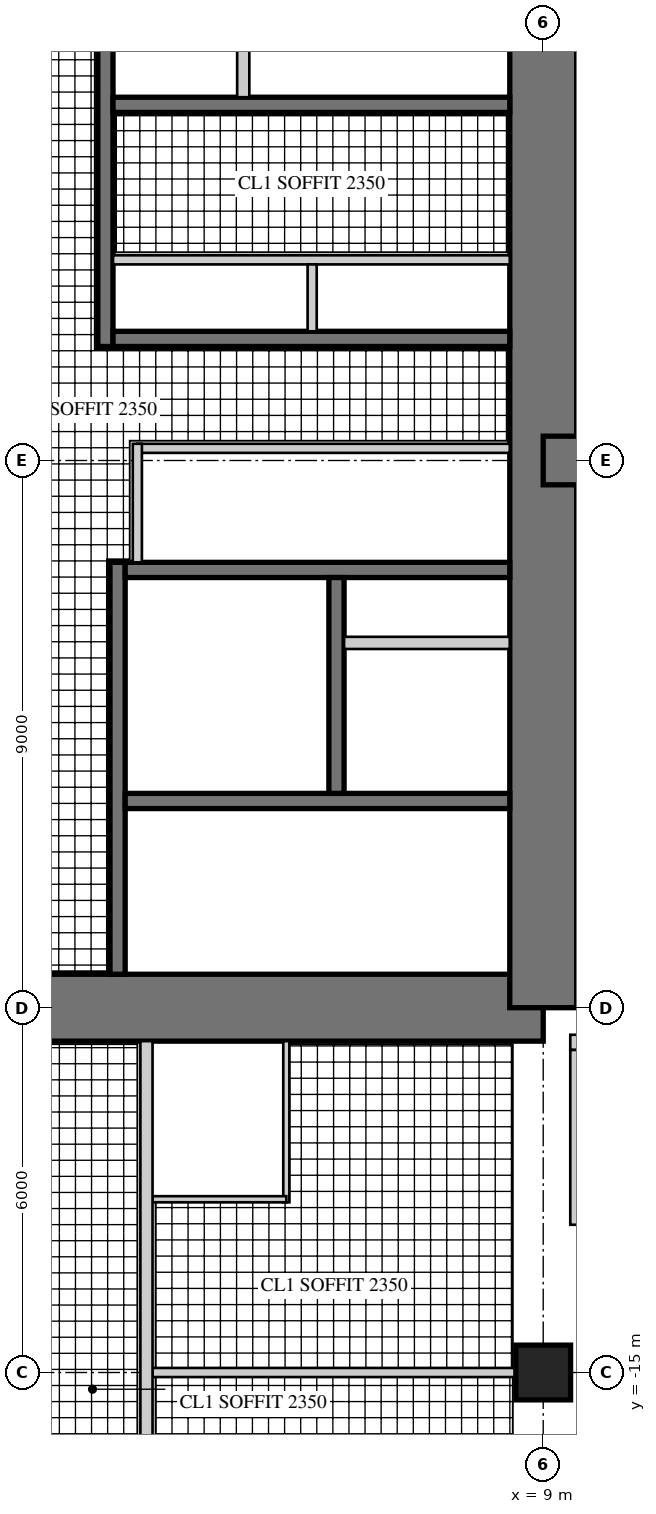
"""IFC4 building model, lengths in metres.
Left out: names, types, materials, properties, quantities, classifications, styles, units other than length and angle.
Written with IfcOpenShell. Run it as: python <this file> out.ifc"""

import sys

from ifc_helpers import new_model, si_unit, direction, frame, frame_2d, origin, origin_2d, place, context, subcontext, project, spatial, rectangle, hollow_rectangle, extrude, element, fill, save


model = new_model("IFC4")
c1 = context("Model", 3, precision=1e-05, world=origin(), true_north=direction((0.0, 1.0)))
c2 = subcontext(c1, "Body", "Model", "MODEL_VIEW")
j1 = project(units=[si_unit("LENGTHUNIT", "METRE"), si_unit("PLANEANGLEUNIT", "RADIAN")], contexts=[c1])
p1 = place(None, origin())
s1 = spatial("IfcSite", under=j1, at=p1, CompositionType="ELEMENT")
p2 = place(p1, origin())
s2 = spatial("IfcBuilding", under=s1, at=p2, CompositionType="ELEMENT")
p3 = place(p2, frame((0.0, 0.0, 200.1)))
s3 = spatial("IfcBuildingStorey", under=s2, at=p3, CompositionType="ELEMENT", Elevation=200.1)
p4 = place(p3, frame((-9.0, -9.0, 0.0), z_axis=(0.0, 0.0, 1.0), x_axis=(1.0, 0.0, 0.0)))
e1 = element("IfcWall", 1, at=p4, inside=s3, PredefinedType="SHEAR", context=c2, shape_type="SweptSolid", body=[
    extrude(rectangle(XDim=18.0, YDim=1.1, at=frame_2d((9.0, 0.0))), origin(), (0.0, 0.0, 1.0), 3.4),
])
p5 = place(p4, frame((9.8, 0.0, 0.0)))
e2 = element("IfcOpeningElement", 2, at=p5, cuts=e1, PredefinedType="OPENING", context=c2, shape_type="SweptSolid", body=[
    extrude(rectangle(XDim=1.0, YDim=2.4, at=frame_2d((0.5, 1.2))), frame((0.0, 0.56, 0.0), z_axis=(0.0, -1.0, 0.0), x_axis=(1.0, 0.0, 0.0)), (0.0, 0.0, 1.0), 1.12),
])
p6 = place(p3, frame((9.0, -9.0, 0.0), z_axis=(0.0, 0.0, 1.0), x_axis=(0.0, 1.0, 0.0)))
e3 = element("IfcWall", 3, at=p6, inside=s3, PredefinedType="SHEAR", context=c2, shape_type="SweptSolid", body=[
    extrude(rectangle(XDim=18.0, YDim=1.1, at=frame_2d((9.0, 0.0))), origin(), (0.0, 0.0, 1.0), 3.4),
])
p7 = place(p6, frame((9.8, 0.0, 0.0)))
e4 = element("IfcOpeningElement", 4, at=p7, cuts=e3, PredefinedType="OPENING", context=c2, shape_type="SweptSolid", body=[
    extrude(rectangle(XDim=1.0, YDim=2.4, at=frame_2d((0.5, 1.2))), frame((0.0, 0.56, 0.0), z_axis=(0.0, -1.0, 0.0), x_axis=(1.0, 0.0, 0.0)), (0.0, 0.0, 1.0), 1.12),
])
p8 = place(p3, frame((1.8, 1.875, 0.0), z_axis=(0.0, 0.0, 1.0), x_axis=(0.0, 1.0, 0.0)))
e5 = element("IfcWall", 5, at=p8, inside=s3, PredefinedType="SHEAR", context=c2, shape_type="SweptSolid", body=[
    extrude(rectangle(XDim=6.575, YDim=0.25, at=frame_2d((3.288, 0.0))), origin(), (0.0, 0.0, 1.0), 3.4),
])
p9 = place(p8, frame((1.875, 0.0, 0.0)))
e6 = element("IfcOpeningElement", 6, at=p9, cuts=e5, PredefinedType="OPENING", context=c2, shape_type="SweptSolid", body=[
    extrude(rectangle(XDim=1.6, YDim=2.4, at=frame_2d((0.8, 1.2))), frame((0.0, 0.135, 0.0), z_axis=(0.0, -1.0, 0.0), x_axis=(1.0, 0.0, 0.0)), (0.0, 0.0, 1.0), 0.27),
])
p10 = place(p3, frame((1.925, 2.0, 0.0), z_axis=(0.0, 0.0, 1.0), x_axis=(1.0, 0.0, 0.0)))
e7 = element("IfcWall", 7, at=p10, inside=s3, PredefinedType="SHEAR", context=c2, shape_type="SweptSolid", body=[
    extrude(rectangle(XDim=6.525, YDim=0.25, at=frame_2d((3.262, 0.0))), origin(), (0.0, 0.0, 1.0), 3.4),
])
p11 = place(p3, frame((1.925, 5.85, 0.0), z_axis=(0.0, 0.0, 1.0), x_axis=(1.0, 0.0, 0.0)))
e8 = element("IfcWall", 8, at=p11, inside=s3, PredefinedType="SHEAR", context=c2, shape_type="SweptSolid", body=[
    extrude(rectangle(XDim=6.525, YDim=0.25, at=frame_2d((3.262, 0.0))), origin(), (0.0, 0.0, 1.0), 3.4),
])
p12 = place(p11, frame((0.521, 0.0, 0.0)))
e9 = element("IfcOpeningElement", 9, at=p12, cuts=e8, PredefinedType="OPENING", context=c2, shape_type="SweptSolid", body=[
    extrude(rectangle(XDim=1.0, YDim=2.1, at=frame_2d((0.5, 1.05))), frame((0.0, 0.135, 0.0), z_axis=(0.0, -1.0, 0.0), x_axis=(1.0, 0.0, 0.0)), (0.0, 0.0, 1.0), 0.27),
])
p13 = place(p11, frame((2.762, 0.0, 0.0)))
e10 = element("IfcOpeningElement", 10, at=p13, cuts=e8, PredefinedType="OPENING", context=c2, shape_type="SweptSolid", body=[
    extrude(rectangle(XDim=1.0, YDim=2.1, at=frame_2d((0.5, 1.05))), frame((0.0, 0.135, 0.0), z_axis=(0.0, -1.0, 0.0), x_axis=(1.0, 0.0, 0.0)), (0.0, 0.0, 1.0), 0.27),
])
p14 = place(p3, frame((1.925, 3.3, 0.0), z_axis=(0.0, 0.0, 1.0), x_axis=(1.0, 0.0, 0.0)))
e11 = element("IfcWall", 11, at=p14, inside=s3, PredefinedType="PARTITIONING", context=c2, shape_type="SweptSolid", body=[
    extrude(rectangle(XDim=6.525, YDim=0.15, at=frame_2d((3.262, 0.0))), origin(), (0.0, 0.0, 1.0), 3.4),
])
p15 = place(p14, frame((0.075, 0.0, 0.0)))
e12 = element("IfcOpeningElement", 12, at=p15, cuts=e11, PredefinedType="OPENING", context=c2, shape_type="SweptSolid", body=[
    extrude(rectangle(XDim=0.8, YDim=2.1, at=frame_2d((0.4, 1.05))), frame((0.0, 0.085, 0.0), z_axis=(0.0, -1.0, 0.0), x_axis=(1.0, 0.0, 0.0)), (0.0, 0.0, 1.0), 0.17),
])
p16 = place(p14, frame((3.675, 0.0, 0.0)))
e13 = element("IfcOpeningElement", 13, at=p16, cuts=e11, PredefinedType="OPENING", context=c2, shape_type="SweptSolid", body=[
    extrude(rectangle(XDim=0.8, YDim=2.1, at=frame_2d((0.4, 1.05))), frame((0.0, 0.085, 0.0), z_axis=(0.0, -1.0, 0.0), x_axis=(1.0, 0.0, 0.0)), (0.0, 0.0, 1.0), 0.17),
])
p17 = place(p3, frame((5.2, 2.125, 0.0), z_axis=(0.0, 0.0, 1.0), x_axis=(0.0, 1.0, 0.0)))
e14 = element("IfcWall", 14, at=p17, inside=s3, PredefinedType="PARTITIONING", context=c2, shape_type="SweptSolid", body=[
    extrude(rectangle(XDim=1.1, YDim=0.15, at=frame_2d((0.55, 0.0))), origin(), (0.0, 0.0, 1.0), 3.4),
])
p18 = place(p3, frame((4.067, 5.975, 0.0), z_axis=(0.0, 0.0, 1.0), x_axis=(0.0, 1.0, 0.0)))
e15 = element("IfcWall", 15, at=p18, inside=s3, PredefinedType="PARTITIONING", context=c2, shape_type="SweptSolid", body=[
    extrude(rectangle(XDim=2.475, YDim=0.2, at=frame_2d((1.237, 0.0))), origin(), (0.0, 0.0, 1.0), 3.4),
])
p19 = place(p3, frame((2.0, -1.675, 0.0), z_axis=(0.0, 0.0, 1.0), x_axis=(0.0, -1.0, 0.0)))
e16 = element("IfcWall", 16, at=p19, inside=s3, PredefinedType="SHEAR", context=c2, shape_type="SweptSolid", body=[
    extrude(rectangle(XDim=6.775, YDim=0.25, at=frame_2d((3.387, 0.0))), origin(), (0.0, 0.0, 1.0), 3.4),
])
p20 = place(p19, frame((0.725, 0.0, 0.0)))
e17 = element("IfcOpeningElement", 17, at=p20, cuts=e16, PredefinedType="OPENING", context=c2, shape_type="SweptSolid", body=[
    extrude(rectangle(XDim=1.0, YDim=2.1, at=frame_2d((0.5, 1.05))), frame((0.0, 0.135, 0.0), z_axis=(0.0, -1.0, 0.0), x_axis=(1.0, 0.0, 0.0)), (0.0, 0.0, 1.0), 0.27),
])
p21 = place(p3, frame((2.125, -1.8, 0.0), z_axis=(0.0, 0.0, 1.0), x_axis=(1.0, 0.0, 0.0)))
e18 = element("IfcWall", 18, at=p21, inside=s3, PredefinedType="SHEAR", context=c2, shape_type="SweptSolid", body=[
    extrude(rectangle(XDim=6.325, YDim=0.25, at=frame_2d((3.163, 0.0))), origin(), (0.0, 0.0, 1.0), 3.4),
])
p22 = place(p3, frame((2.125, -5.6, 0.0), z_axis=(0.0, 0.0, 1.0), x_axis=(1.0, 0.0, 0.0)))
e19 = element("IfcWall", 19, at=p22, inside=s3, PredefinedType="SHEAR", context=c2, shape_type="SweptSolid", body=[
    extrude(rectangle(XDim=6.325, YDim=0.25, at=frame_2d((3.163, 0.0))), origin(), (0.0, 0.0, 1.0), 3.4),
])
p23 = place(p22, frame((0.175, 0.0, 0.0)))
e20 = element("IfcOpeningElement", 20, at=p23, cuts=e19, PredefinedType="OPENING", context=c2, shape_type="SweptSolid", body=[
    extrude(rectangle(XDim=1.0, YDim=2.1, at=frame_2d((0.5, 1.05))), frame((0.0, 0.135, 0.0), z_axis=(0.0, -1.0, 0.0), x_axis=(1.0, 0.0, 0.0)), (0.0, 0.0, 1.0), 0.27),
])
p24 = place(p3, frame((5.6, -1.925, 0.0), z_axis=(0.0, 0.0, 1.0), x_axis=(0.0, -1.0, 0.0)))
e21 = element("IfcWall", 21, at=p24, inside=s3, PredefinedType="SHEAR", context=c2, shape_type="SweptSolid", body=[
    extrude(rectangle(XDim=3.55, YDim=0.25, at=frame_2d((1.775, 0.0))), origin(), (0.0, 0.0, 1.0), 3.4),
])
p25 = place(p24, frame((1.525, 0.0, 0.0)))
e22 = element("IfcOpeningElement", 22, at=p25, cuts=e21, PredefinedType="OPENING", context=c2, shape_type="SweptSolid", body=[
    extrude(rectangle(XDim=1.1, YDim=2.2, at=frame_2d((0.55, 1.1))), frame((0.0, 0.135, 0.0), z_axis=(0.0, -1.0, 0.0), x_axis=(1.0, 0.0, 0.0)), (0.0, 0.0, 1.0), 0.27),
])
p26 = place(p24, frame((0.075, 0.0, 0.0)))
e23 = element("IfcOpeningElement", 23, at=p26, cuts=e21, PredefinedType="OPENING", context=c2, shape_type="SweptSolid", body=[
    extrude(rectangle(XDim=0.8, YDim=2.1, at=frame_2d((0.4, 1.05))), frame((0.0, 0.135, 0.0), z_axis=(0.0, -1.0, 0.0), x_axis=(1.0, 0.0, 0.0)), (0.0, 0.0, 1.0), 0.27),
])
p27 = place(p3, frame((5.725, -3.0, 0.0), z_axis=(0.0, 0.0, 1.0), x_axis=(1.0, 0.0, 0.0)))
e24 = element("IfcWall", 24, at=p27, inside=s3, PredefinedType="PARTITIONING", context=c2, shape_type="SweptSolid", body=[
    extrude(rectangle(XDim=2.725, YDim=0.2, at=frame_2d((1.362, 0.0))), origin(), (0.0, 0.0, 1.0), 3.4),
])
p28 = place(p3, frame((9.0, 0.0, 0.0), z_axis=(0.0, 0.0, 1.0), x_axis=(1.0, 0.0, 0.0)))
e25 = element("IfcWall", 25, at=p28, inside=s3, PredefinedType="SHEAR", context=c2, shape_type="SweptSolid", body=[
    extrude(rectangle(XDim=9.0, YDim=0.8, at=frame_2d((4.5, 0.0))), origin(), (0.0, 0.0, 1.0), 3.4),
])
p29 = place(p28, frame((3.95, 0.0, 0.0)))
e26 = element("IfcOpeningElement", 26, at=p29, cuts=e25, PredefinedType="OPENING", context=c2, shape_type="SweptSolid", body=[
    extrude(rectangle(XDim=1.0, YDim=2.15, at=frame_2d((0.5, 1.075))), frame((0.0, 0.41, 0.0), z_axis=(0.0, -1.0, 0.0), x_axis=(1.0, 0.0, 0.0)), (0.0, 0.0, 1.0), 0.82),
])
p30 = place(p28, frame((7.0, 0.0, 0.0)))
e27 = element("IfcOpeningElement", 27, at=p30, cuts=e25, PredefinedType="OPENING", context=c2, shape_type="SweptSolid", body=[
    extrude(rectangle(XDim=1.0, YDim=2.2, at=frame_2d((0.5, 1.1))), frame((0.0, 0.41, 0.0), z_axis=(0.0, -1.0, 0.0), x_axis=(1.0, 0.0, 0.0)), (0.0, 0.0, 1.0), 0.82),
])
p31 = place(p3, frame((9.0, -15.0, 0.0), z_axis=(0.0, 0.0, 1.0), x_axis=(1.0, 0.0, 0.0)))
e28 = element("IfcColumn", 28, at=p31, inside=s3, PredefinedType="COLUMN", context=c2, shape_type="SweptSolid", body=[
    extrude(rectangle(XDim=0.9, YDim=0.9, at=origin_2d()), origin(), (0.0, 0.0, 1.0), 3.4),
])
p32 = place(p3, frame((9.445, -9.57, 0.0), z_axis=(0.0, 0.0, 1.0), x_axis=(1.0, 0.0, 0.0)))
e29 = element("IfcWall", 29, at=p32, inside=s3, PredefinedType="SOLIDWALL", context=c2, shape_type="SweptSolid", body=[
    extrude(rectangle(XDim=3.125, YDim=0.25, at=frame_2d((1.562, 0.0))), origin(), (0.0, 0.0, 1.0), 3.22),
])
p33 = place(p32, frame((0.6, 0.0, 0.0)))
e30 = element("IfcOpeningElement", 30, at=p33, cuts=e29, PredefinedType="OPENING", context=c2, shape_type="SweptSolid", body=[
    extrude(rectangle(XDim=1.0, YDim=2.2, at=frame_2d((0.5, 1.1))), frame((0.0, 0.135, 0.0), z_axis=(0.0, -1.0, 0.0), x_axis=(1.0, 0.0, 0.0)), (0.0, 0.0, 1.0), 0.27),
])
p34 = place(p3, frame((9.57, -12.57, 0.0), z_axis=(0.0, 0.0, 1.0), x_axis=(0.0, 1.0, 0.0)))
e31 = element("IfcWall", 31, at=p34, inside=s3, PredefinedType="SOLIDWALL", context=c2, shape_type="SweptSolid", body=[
    extrude(rectangle(XDim=2.875, YDim=0.25, at=frame_2d((1.438, 0.0))), origin(), (0.0, 0.0, 1.0), 3.22),
])
p35 = place(p34, frame((0.6, 0.0, 0.0)))
e32 = element("IfcOpeningElement", 32, at=p35, cuts=e31, PredefinedType="OPENING", context=c2, shape_type="SweptSolid", body=[
    extrude(rectangle(XDim=1.0, YDim=2.2, at=frame_2d((0.5, 1.1))), frame((0.0, 0.135, 0.0), z_axis=(0.0, -1.0, 0.0), x_axis=(1.0, 0.0, 0.0)), (0.0, 0.0, 1.0), 0.27),
])
p36 = place(p3, frame((2.325, 0.2, 0.0), z_axis=(0.0, 0.0, 1.0), x_axis=(1.0, 0.0, 0.0)))
e33 = element("IfcWall", 33, at=p36, inside=s3, PredefinedType="PARTITIONING", context=c2, shape_type="SweptSolid", body=[
    extrude(rectangle(XDim=6.125, YDim=0.15, at=frame_2d((3.062, 0.0))), origin(), (0.0, 0.0, 1.0), 3.22),
])
p37 = place(p36, frame((0.4, 0.0, 0.0)))
e34 = element("IfcOpeningElement", 34, at=p37, cuts=e33, PredefinedType="OPENING", context=c2, shape_type="SweptSolid", body=[
    extrude(rectangle(XDim=1.0, YDim=2.1, at=frame_2d((0.5, 1.05))), frame((0.0, 0.085, 0.0), z_axis=(0.0, -1.0, 0.0), x_axis=(1.0, 0.0, 0.0)), (0.0, 0.0, 1.0), 0.17),
])
p38 = place(p3, frame((2.325, -1.675, 0.0), z_axis=(0.0, 0.0, 1.0), x_axis=(0.0, 1.0, 0.0)))
e35 = element("IfcWall", 35, at=p38, inside=s3, PredefinedType="PARTITIONING", context=c2, shape_type="SweptSolid", body=[
    extrude(rectangle(XDim=1.95, YDim=0.15, at=frame_2d((0.975, 0.0))), origin(), (0.0, 0.0, 1.0), 3.22),
])
p39 = place(p3, frame((9.55, 4.775, 0.0), z_axis=(0.0, 0.0, 1.0), x_axis=(1.0, 0.0, 0.0)))
e36 = element("IfcWall", 36, at=p39, inside=s3, PredefinedType="PARTITIONING", context=c2, shape_type="SweptSolid", body=[
    extrude(rectangle(XDim=3.1, YDim=0.1, at=frame_2d((1.55, 0.0))), origin(), (0.0, 0.0, 1.0), 3.22),
])
p40 = place(p3, frame((4.775, -9.55, 0.0), z_axis=(0.0, 0.0, 1.0), x_axis=(0.0, -1.0, 0.0)))
e37 = element("IfcWall", 37, at=p40, inside=s3, PredefinedType="PARTITIONING", context=c2, shape_type="SweptSolid", body=[
    extrude(rectangle(XDim=2.65, YDim=0.1, at=frame_2d((1.325, 0.0))), origin(), (0.0, 0.0, 1.0), 3.22),
])
p41 = place(p3, frame((2.575, -12.15, 0.0), z_axis=(0.0, 0.0, 1.0), x_axis=(1.0, 0.0, 0.0)))
e38 = element("IfcWall", 38, at=p41, inside=s3, PredefinedType="PARTITIONING", context=c2, shape_type="SweptSolid", body=[
    extrude(rectangle(XDim=2.2, YDim=0.1, at=frame_2d((1.1, 0.0))), origin(), (0.0, 0.0, 1.0), 3.22),
])
p42 = place(p41, frame((0.55, 0.0, 0.0)))
e39 = element("IfcOpeningElement", 39, at=p42, cuts=e38, PredefinedType="OPENING", context=c2, shape_type="SweptSolid", body=[
    extrude(rectangle(XDim=0.9, YDim=2.1, at=frame_2d((0.45, 1.05))), frame((0.0, 0.06, 0.0), z_axis=(0.0, -1.0, 0.0), x_axis=(1.0, 0.0, 0.0)), (0.0, 0.0, 1.0), 0.12),
])
p43 = place(p3, frame((2.575, -15.0, 0.0), z_axis=(0.0, 0.0, 1.0), x_axis=(1.0, 0.0, 0.0)))
e40 = element("IfcWall", 40, at=p43, inside=s3, PredefinedType="PARTITIONING", context=c2, shape_type="SweptSolid", body=[
    extrude(rectangle(XDim=5.975, YDim=0.15, at=frame_2d((2.988, 0.0))), origin(), (0.0, 0.0, 1.0), 2.47),
])
p44 = place(p43, frame((0.5, 0.0, 0.0)))
e41 = element("IfcOpeningElement", 41, at=p44, cuts=e40, PredefinedType="OPENING", context=c2, shape_type="SweptSolid", body=[
    extrude(rectangle(XDim=1.0, YDim=2.1, at=frame_2d((0.5, 1.05))), frame((0.0, 0.085, 0.0), z_axis=(0.0, -1.0, 0.0), x_axis=(1.0, 0.0, 0.0)), (0.0, 0.0, 1.0), 0.17),
])
p45 = place(p3, frame((2.475, -9.55, 0.0), z_axis=(0.0, 0.0, 1.0), x_axis=(0.0, -1.0, 0.0)))
e42 = element("IfcWall", 42, at=p45, inside=s3, PredefinedType="SOLIDWALL", context=c2, shape_type="SweptSolid", body=[
    extrude(rectangle(XDim=11.45, YDim=0.2, at=frame_2d((5.725, 0.0))), origin(), (0.0, 0.0, 1.0), 3.22),
])
p46 = place(p45, frame((3.4, 0.0, 0.0)))
e43 = element("IfcOpeningElement", 43, at=p46, cuts=e42, PredefinedType="OPENING", context=c2, shape_type="SweptSolid", body=[
    extrude(rectangle(XDim=1.0, YDim=2.15, at=frame_2d((0.5, 1.075))), frame((0.0, 0.11, 0.0), z_axis=(0.0, -1.0, 0.0), x_axis=(1.0, 0.0, 0.0)), (0.0, 0.0, 1.0), 0.22),
])
p47 = place(p35, origin())
e44 = element("IfcDoor", 44, at=p47, inside=s3, OperationType="SINGLE_SWING_RIGHT", PredefinedType="DOOR", context=c2, shape_type="SweptSolid", body=[
    extrude(hollow_rectangle(XDim=1.0, YDim=2.2, WallThickness=0.06, at=frame_2d((0.5, 1.1))), frame((0.0, 0.025, 0.0), z_axis=(0.0, -1.0, 0.0), x_axis=(1.0, 0.0, 0.0)), (0.0, 0.0, 1.0), 0.05),
    extrude(rectangle(XDim=0.879, YDim=2.079, at=frame_2d((0.5, 1.1))), frame((0.0, 0.025, 0.0), z_axis=(0.0, -1.0, 0.0), x_axis=(1.0, 0.0, 0.0)), (0.0, 0.0, 1.0), 0.05),
])
fill(e32, e44)
p48 = place(p37, frame((1.0, 0.0, 0.0), z_axis=(0.0, 0.0, 1.0), x_axis=(-1.0, 0.0, 0.0)))
e45 = element("IfcDoor", 45, at=p48, inside=s3, OperationType="SINGLE_SWING_RIGHT", PredefinedType="DOOR", context=c2, shape_type="SweptSolid", body=[
    extrude(rectangle(XDim=1.0, YDim=2.1, at=frame_2d((0.5, 1.05))), frame((0.0, 0.025, 0.0), z_axis=(0.0, -1.0, 0.0), x_axis=(1.0, 0.0, 0.0)), (0.0, 0.0, 1.0), 0.05),
])
fill(e34, e45)
p49 = place(p42, origin())
e46 = element("IfcDoor", 46, at=p49, inside=s3, OperationType="SINGLE_SWING_LEFT", PredefinedType="DOOR", context=c2, shape_type="SweptSolid", body=[
    extrude(rectangle(XDim=0.9, YDim=2.1, at=frame_2d((0.45, 1.05))), frame((0.0, 0.025, 0.0), z_axis=(0.0, -1.0, 0.0), x_axis=(1.0, 0.0, 0.0)), (0.0, 0.0, 1.0), 0.05),
])
fill(e39, e46)
p50 = place(p44, origin())
e47 = element("IfcDoor", 47, at=p50, inside=s3, OperationType="SINGLE_SWING_LEFT", PredefinedType="DOOR", context=c2, shape_type="SweptSolid", body=[
    extrude(rectangle(XDim=1.0, YDim=2.1, at=frame_2d((0.5, 1.05))), frame((0.0, 0.025, 0.0), z_axis=(0.0, -1.0, 0.0), x_axis=(1.0, 0.0, 0.0)), (0.0, 0.0, 1.0), 0.05),
])
fill(e41, e47)
p51 = place(p46, origin())
e48 = element("IfcDoor", 48, at=p51, inside=s3, OperationType="SINGLE_SWING_LEFT", PredefinedType="DOOR", context=c2, shape_type="SweptSolid", body=[
    extrude(rectangle(XDim=1.0, YDim=2.15, at=frame_2d((0.5, 1.075))), frame((0.0, 0.025, 0.0), z_axis=(0.0, -1.0, 0.0), x_axis=(1.0, 0.0, 0.0)), (0.0, 0.0, 1.0), 0.05),
])
fill(e43, e48)
p52 = place(p5, origin())
e49 = element("IfcDoor", 49, at=p52, inside=s3, OperationType="SINGLE_SWING_RIGHT", PredefinedType="DOOR", context=c2, shape_type="SweptSolid", body=[
    extrude(rectangle(XDim=1.0, YDim=2.4, at=frame_2d((0.5, 1.2))), frame((0.0, 0.055, 0.0), z_axis=(0.0, -1.0, 0.0), x_axis=(1.0, 0.0, 0.0)), (0.0, 0.0, 1.0), 0.05),
])
fill(e2, e49)
p53 = place(p7, origin())
e50 = element("IfcDoor", 50, at=p53, inside=s3, OperationType="SINGLE_SWING_RIGHT", PredefinedType="DOOR", context=c2, shape_type="SweptSolid", body=[
    extrude(rectangle(XDim=1.0, YDim=2.4, at=frame_2d((0.5, 1.2))), frame((0.0, 0.055, 0.0), z_axis=(0.0, -1.0, 0.0), x_axis=(1.0, 0.0, 0.0)), (0.0, 0.0, 1.0), 0.05),
])
fill(e4, e50)
p54 = place(p9, frame((1.6, 0.0, 0.0), z_axis=(0.0, 0.0, 1.0), x_axis=(-1.0, 0.0, 0.0)))
e51 = element("IfcDoor", 51, at=p54, inside=s3, OperationType="DOUBLE_DOOR_SINGLE_SWING", PredefinedType="DOOR", context=c2, shape_type="SweptSolid", body=[
    extrude(rectangle(XDim=1.6, YDim=2.4, at=frame_2d((0.8, 1.2))), frame((0.0, 0.025, 0.0), z_axis=(0.0, -1.0, 0.0), x_axis=(1.0, 0.0, 0.0)), (0.0, 0.0, 1.0), 0.05),
])
fill(e6, e51)
p55 = place(p15, frame((0.8, 0.0, 0.0), z_axis=(0.0, 0.0, 1.0), x_axis=(-1.0, 0.0, 0.0)))
e52 = element("IfcDoor", 52, at=p55, inside=s3, OperationType="SINGLE_SWING_RIGHT", PredefinedType="DOOR", context=c2, shape_type="SweptSolid", body=[
    extrude(rectangle(XDim=0.8, YDim=2.1, at=frame_2d((0.4, 1.05))), frame((0.0, 0.025, 0.0), z_axis=(0.0, -1.0, 0.0), x_axis=(1.0, 0.0, 0.0)), (0.0, 0.0, 1.0), 0.05),
])
fill(e12, e52)
p56 = place(p16, frame((0.8, 0.0, 0.0), z_axis=(0.0, 0.0, 1.0), x_axis=(-1.0, 0.0, 0.0)))
e53 = element("IfcDoor", 53, at=p56, inside=s3, OperationType="SINGLE_SWING_RIGHT", PredefinedType="DOOR", context=c2, shape_type="SweptSolid", body=[
    extrude(rectangle(XDim=0.8, YDim=2.1, at=frame_2d((0.4, 1.05))), frame((0.0, 0.025, 0.0), z_axis=(0.0, -1.0, 0.0), x_axis=(1.0, 0.0, 0.0)), (0.0, 0.0, 1.0), 0.05),
])
fill(e13, e53)
p57 = place(p20, origin())
e54 = element("IfcDoor", 54, at=p57, inside=s3, OperationType="SINGLE_SWING_LEFT", PredefinedType="DOOR", context=c2, shape_type="SweptSolid", body=[
    extrude(rectangle(XDim=1.0, YDim=2.1, at=frame_2d((0.5, 1.05))), frame((0.0, 0.025, 0.0), z_axis=(0.0, -1.0, 0.0), x_axis=(1.0, 0.0, 0.0)), (0.0, 0.0, 1.0), 0.05),
])
fill(e17, e54)
p58 = place(p23, frame((1.0, 0.0, 0.0), z_axis=(0.0, 0.0, 1.0), x_axis=(-1.0, 0.0, 0.0)))
e55 = element("IfcDoor", 55, at=p58, inside=s3, OperationType="SINGLE_SWING_RIGHT", PredefinedType="DOOR", context=c2, shape_type="SweptSolid", body=[
    extrude(rectangle(XDim=1.0, YDim=2.1, at=frame_2d((0.5, 1.05))), frame((0.0, 0.025, 0.0), z_axis=(0.0, -1.0, 0.0), x_axis=(1.0, 0.0, 0.0)), (0.0, 0.0, 1.0), 0.05),
])
fill(e20, e55)
p59 = place(p25, origin())
e56 = element("IfcDoor", 56, at=p59, inside=s3, OperationType="DOUBLE_DOOR_SLIDING", PredefinedType="DOOR", context=c2, shape_type="SweptSolid", body=[
    extrude(rectangle(XDim=1.1, YDim=2.2, at=frame_2d((0.55, 1.1))), frame((0.0, 0.025, 0.0), z_axis=(0.0, -1.0, 0.0), x_axis=(1.0, 0.0, 0.0)), (0.0, 0.0, 1.0), 0.05),
])
fill(e22, e56)
p60 = place(p26, origin())
e57 = element("IfcDoor", 57, at=p60, inside=s3, OperationType="SINGLE_SWING_LEFT", PredefinedType="DOOR", context=c2, shape_type="SweptSolid", body=[
    extrude(rectangle(XDim=0.8, YDim=2.1, at=frame_2d((0.4, 1.05))), frame((0.0, 0.025, 0.0), z_axis=(0.0, -1.0, 0.0), x_axis=(1.0, 0.0, 0.0)), (0.0, 0.0, 1.0), 0.05),
])
fill(e23, e57)
p61 = place(p12, origin())
e58 = element("IfcDoor", 58, at=p61, inside=s3, OperationType="SINGLE_SWING_LEFT", PredefinedType="DOOR", context=c2, shape_type="SweptSolid", body=[
    extrude(rectangle(XDim=1.0, YDim=2.1, at=frame_2d((0.5, 1.05))), frame((0.0, 0.025, 0.0), z_axis=(0.0, -1.0, 0.0), x_axis=(1.0, 0.0, 0.0)), (0.0, 0.0, 1.0), 0.05),
])
fill(e9, e58)
p62 = place(p13, origin())
e59 = element("IfcDoor", 59, at=p62, inside=s3, OperationType="SINGLE_SWING_LEFT", PredefinedType="DOOR", context=c2, shape_type="SweptSolid", body=[
    extrude(rectangle(XDim=1.0, YDim=2.1, at=frame_2d((0.5, 1.05))), frame((0.0, 0.025, 0.0), z_axis=(0.0, -1.0, 0.0), x_axis=(1.0, 0.0, 0.0)), (0.0, 0.0, 1.0), 0.05),
])
fill(e10, e59)
save(model, sys.argv[1])
